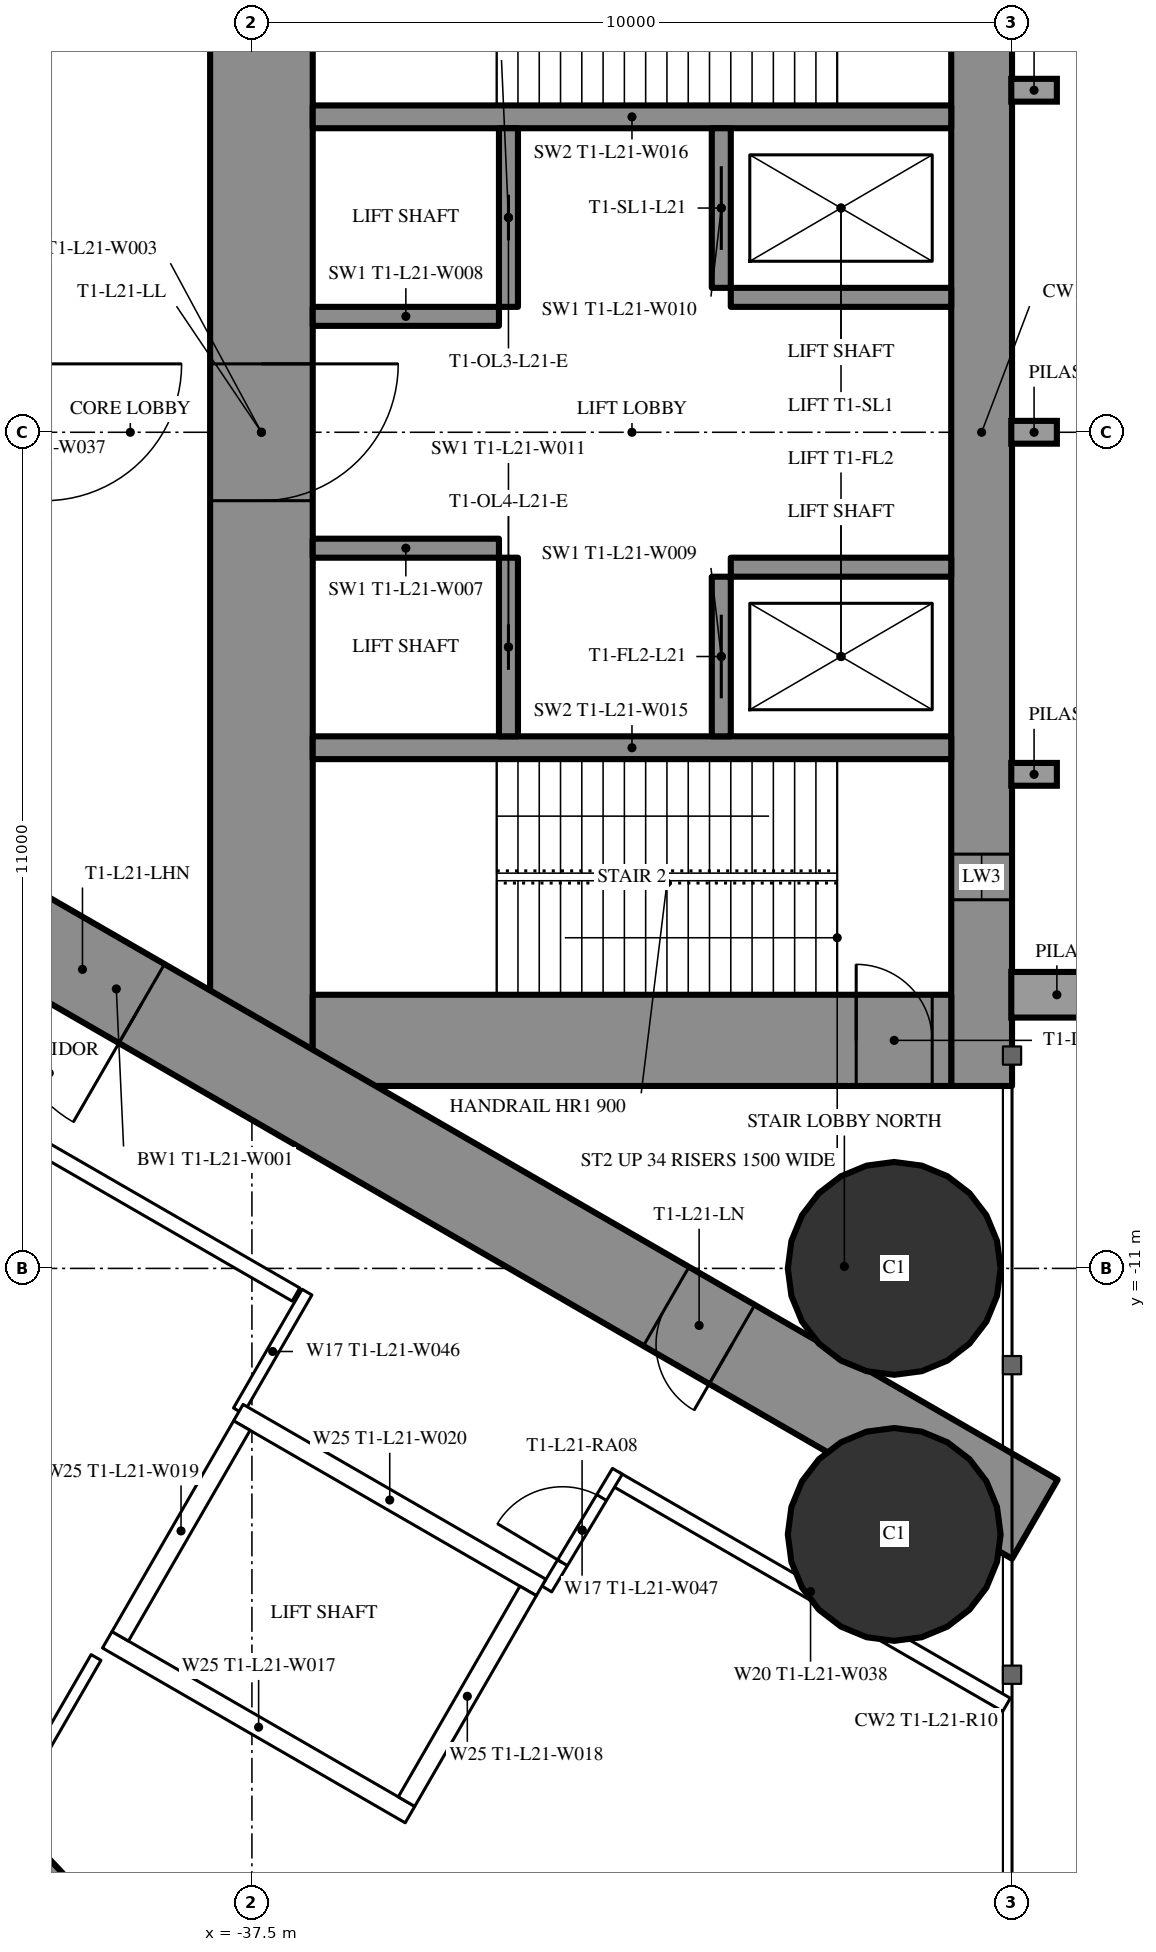
"""IFC4 building model, lengths in metres.
Left out: names, types, materials, properties, quantities, classifications, styles, units other than length and angle.
Written with IfcOpenShell. Run it as: python <this file> out.ifc"""

import sys

from ifc_helpers import new_model, si_unit, direction, frame, frame_2d, origin, origin_2d, place, context, subcontext, project, spatial, rectangle, hollow_circle, extrude, element, fill, save


model = new_model("IFC4")
c1 = context("Model", 3, precision=1e-05, world=origin(), true_north=direction((0.0, 1.0)))
c2 = subcontext(c1, "Body", "Model", "MODEL_VIEW")
j1 = project(units=[si_unit("LENGTHUNIT", "METRE"), si_unit("PLANEANGLEUNIT", "RADIAN")], contexts=[c1])
p1 = place(None, origin())
s1 = spatial("IfcSite", under=j1, at=p1, CompositionType="ELEMENT")
p2 = place(p1, origin())
s2 = spatial("IfcBuilding", under=s1, at=p2, CompositionType="ELEMENT")
p3 = place(p2, frame((0.0, 0.0, 81.0)))
s3 = spatial("IfcBuildingStorey", under=s2, at=p3, CompositionType="ELEMENT", Elevation=81.0)
for number, where, z_axis, x_axis in (
    (1, (-29.05, -11.0, 0.0), (0.0, 0.0, 1.0), (1.0, 0.0, 0.0)),
    (2, (-29.05, -14.5, 0.0), (0.0, 0.0, 1.0), (1.0, 0.0, 0.0)),
):
    element("IfcColumn", number, at=place(p3, frame(where, z_axis=z_axis, x_axis=x_axis)), inside=s3, PredefinedType="COLUMN", context=c2, shape_type="SweptSolid", body=[
        extrude(hollow_circle(Radius=1.4, WallThickness=0.12, at=origin_2d()), origin(), (0.0, 0.0, 1.0), 6.0),
    ])
p4 = place(p3, frame((-43.265, -21.567, 0.0), z_axis=(0.0, 0.0, 1.0), x_axis=(0.728105540353, 0.685465040762, 0.0)))
e3 = element("IfcWall", 3, at=p4, inside=s3, PredefinedType="SHEAR", context=c2, shape_type="SweptSolid", body=[
    extrude(rectangle(XDim=4.174, YDim=2.8, at=frame_2d((2.087, 0.0))), origin(), (0.0, 0.0, 1.0), 6.0),
])
p5 = place(p3, frame((-27.9, 8.6, 0.0), z_axis=(0.0, 0.0, 1.0), x_axis=(0.0, -1.0, 0.0)))
e4 = element("IfcWall", 4, at=p5, inside=s3, PredefinedType="SHEAR", context=c2, shape_type="SweptSolid", body=[
    extrude(rectangle(XDim=17.2, YDim=0.8, at=frame_2d((8.6, 0.0))), origin(), (0.0, 0.0, 1.0), 6.0),
])
p6 = place(p5, frame((2.45, 0.0, 0.6)))
e5 = element("IfcOpeningElement", 5, at=p6, cuts=e4, PredefinedType="OPENING", context=c2, shape_type="SweptSolid", body=[
    extrude(rectangle(XDim=0.6, YDim=4.5, at=frame_2d((0.3, 2.25))), frame((0.0, 0.41, 0.0), z_axis=(0.0, -1.0, 0.0), x_axis=(1.0, 0.0, 0.0)), (0.0, 0.0, 1.0), 0.82),
])
p7 = place(p5, frame((14.15, 0.0, 0.6)))
e6 = element("IfcOpeningElement", 6, at=p7, cuts=e4, PredefinedType="OPENING", context=c2, shape_type="SweptSolid", body=[
    extrude(rectangle(XDim=0.6, YDim=4.5, at=frame_2d((0.3, 2.25))), frame((0.0, 0.41, 0.0), z_axis=(0.0, -1.0, 0.0), x_axis=(1.0, 0.0, 0.0)), (0.0, 0.0, 1.0), 0.82),
])
p8 = place(p3, frame((-37.375, 8.6, 0.0), z_axis=(0.0, 0.0, 1.0), x_axis=(0.0, -1.0, 0.0)))
e7 = element("IfcWall", 7, at=p8, inside=s3, PredefinedType="SHEAR", context=c2, shape_type="SweptSolid", body=[
    extrude(rectangle(XDim=17.2, YDim=1.35, at=frame_2d((8.6, 0.0))), origin(), (0.0, 0.0, 1.0), 6.0),
])
p9 = place(p8, frame((7.7, 0.0, 0.0)))
e8 = element("IfcOpeningElement", 8, at=p9, cuts=e7, PredefinedType="OPENING", context=c2, shape_type="SweptSolid", body=[
    extrude(rectangle(XDim=1.8, YDim=2.2, at=frame_2d((0.9, 1.1))), frame((0.0, 0.685, 0.0), z_axis=(0.0, -1.0, 0.0), x_axis=(1.0, 0.0, 0.0)), (0.0, 0.0, 1.0), 1.37),
])
p10 = place(p3, frame((-28.3, -8.0, 0.0), z_axis=(0.0, 0.0, 1.0), x_axis=(-1.0, 0.0, 0.0)))
e9 = element("IfcWall", 9, at=p10, inside=s3, PredefinedType="SHEAR", context=c2, shape_type="SweptSolid", body=[
    extrude(rectangle(XDim=8.4, YDim=1.2, at=frame_2d((4.2, 0.0))), origin(), (0.0, 0.0, 1.0), 6.0),
])
p11 = place(p10, frame((0.25, 0.0, 0.0)))
e10 = element("IfcOpeningElement", 10, at=p11, cuts=e9, PredefinedType="OPENING", context=c2, shape_type="SweptSolid", body=[
    extrude(rectangle(XDim=1.0, YDim=2.2, at=frame_2d((0.5, 1.1))), frame((0.0, 0.61, 0.0), z_axis=(0.0, -1.0, 0.0), x_axis=(1.0, 0.0, 0.0)), (0.0, 0.0, 1.0), 1.22),
])
for number, where, z_axis, x_axis in (
    (11, (-28.3, 4.15, 0.0), (0.0, 0.0, 1.0), (-1.0, 0.0, 0.0)),
    (12, (-28.3, -4.15, 0.0), (0.0, 0.0, 1.0), (-1.0, 0.0, 0.0)),
):
    element("IfcWall", number, at=place(p3, frame(where, z_axis=z_axis, x_axis=x_axis)), inside=s3, PredefinedType="SHEAR", context=c2, shape_type="SweptSolid", body=[
        extrude(rectangle(XDim=8.4, YDim=0.3, at=frame_2d((4.2, 0.0))), origin(), (0.0, 0.0, 1.0), 6.0),
    ])
p12 = place(p3, frame((-31.325, 4.0, 0.0), z_axis=(0.0, 0.0, 1.0), x_axis=(0.0, -1.0, 0.0)))
e13 = element("IfcWall", 13, at=p12, inside=s3, PredefinedType="SHEAR", context=c2, shape_type="SweptSolid", body=[
    extrude(rectangle(XDim=2.1, YDim=0.25, at=frame_2d((1.05, 0.0))), origin(), (0.0, 0.0, 1.0), 6.0),
])
p13 = place(p12, frame((0.5, 0.0, 0.0)))
e14 = element("IfcOpeningElement", 14, at=p13, cuts=e13, PredefinedType="OPENING", context=c2, shape_type="SweptSolid", body=[
    extrude(rectangle(XDim=1.1, YDim=2.2, at=frame_2d((0.55, 1.1))), frame((0.0, 0.135, 0.0), z_axis=(0.0, -1.0, 0.0), x_axis=(1.0, 0.0, 0.0)), (0.0, 0.0, 1.0), 0.27),
])
p14 = place(p3, frame((-34.125, 4.0, 0.0), z_axis=(0.0, 0.0, 1.0), x_axis=(0.0, -1.0, 0.0)))
e15 = element("IfcWall", 15, at=p14, inside=s3, PredefinedType="SHEAR", context=c2, shape_type="SweptSolid", body=[
    extrude(rectangle(XDim=2.35, YDim=0.25, at=frame_2d((1.175, 0.0))), origin(), (0.0, 0.0, 1.0), 6.0),
])
p15 = place(p14, frame((0.875, 0.0, 0.0)))
e16 = element("IfcOpeningElement", 16, at=p15, cuts=e15, PredefinedType="OPENING", context=c2, shape_type="SweptSolid", body=[
    extrude(rectangle(XDim=0.6, YDim=2.0, at=frame_2d((0.3, 1.0))), frame((0.0, 0.135, 0.0), z_axis=(0.0, -1.0, 0.0), x_axis=(1.0, 0.0, 0.0)), (0.0, 0.0, 1.0), 0.27),
])
p16 = place(p3, frame((-28.3, 1.775, 0.0), z_axis=(0.0, 0.0, 1.0), x_axis=(-1.0, 0.0, 0.0)))
e17 = element("IfcWall", 17, at=p16, inside=s3, PredefinedType="SHEAR", context=c2, shape_type="SweptSolid", body=[
    extrude(rectangle(XDim=2.9, YDim=0.25, at=frame_2d((1.45, 0.0))), origin(), (0.0, 0.0, 1.0), 6.0),
])
p17 = place(p3, frame((-34.25, 1.525, 0.0), z_axis=(0.0, 0.0, 1.0), x_axis=(-1.0, 0.0, 0.0)))
e18 = element("IfcWall", 18, at=p17, inside=s3, PredefinedType="SHEAR", context=c2, shape_type="SweptSolid", body=[
    extrude(rectangle(XDim=2.45, YDim=0.25, at=frame_2d((1.225, 0.0))), origin(), (0.0, 0.0, 1.0), 6.0),
])
p18 = place(p3, frame((-31.325, -1.9, 0.0), z_axis=(0.0, 0.0, 1.0), x_axis=(0.0, -1.0, 0.0)))
e19 = element("IfcWall", 19, at=p18, inside=s3, PredefinedType="SHEAR", context=c2, shape_type="SweptSolid", body=[
    extrude(rectangle(XDim=2.1, YDim=0.25, at=frame_2d((1.05, 0.0))), origin(), (0.0, 0.0, 1.0), 6.0),
])
p19 = place(p18, frame((0.5, 0.0, 0.0)))
e20 = element("IfcOpeningElement", 20, at=p19, cuts=e19, PredefinedType="OPENING", context=c2, shape_type="SweptSolid", body=[
    extrude(rectangle(XDim=1.1, YDim=2.2, at=frame_2d((0.55, 1.1))), frame((0.0, 0.135, 0.0), z_axis=(0.0, -1.0, 0.0), x_axis=(1.0, 0.0, 0.0)), (0.0, 0.0, 1.0), 0.27),
])
p20 = place(p3, frame((-34.125, -1.65, 0.0), z_axis=(0.0, 0.0, 1.0), x_axis=(0.0, -1.0, 0.0)))
e21 = element("IfcWall", 21, at=p20, inside=s3, PredefinedType="SHEAR", context=c2, shape_type="SweptSolid", body=[
    extrude(rectangle(XDim=2.35, YDim=0.25, at=frame_2d((1.175, 0.0))), origin(), (0.0, 0.0, 1.0), 6.0),
])
p21 = place(p20, frame((0.875, 0.0, 0.0)))
e22 = element("IfcOpeningElement", 22, at=p21, cuts=e21, PredefinedType="OPENING", context=c2, shape_type="SweptSolid", body=[
    extrude(rectangle(XDim=0.6, YDim=2.0, at=frame_2d((0.3, 1.0))), frame((0.0, 0.135, 0.0), z_axis=(0.0, -1.0, 0.0), x_axis=(1.0, 0.0, 0.0)), (0.0, 0.0, 1.0), 0.27),
])
p22 = place(p3, frame((-28.3, -1.775, 0.0), z_axis=(0.0, 0.0, 1.0), x_axis=(-1.0, 0.0, 0.0)))
e23 = element("IfcWall", 23, at=p22, inside=s3, PredefinedType="SHEAR", context=c2, shape_type="SweptSolid", body=[
    extrude(rectangle(XDim=2.9, YDim=0.25, at=frame_2d((1.45, 0.0))), origin(), (0.0, 0.0, 1.0), 6.0),
])
p23 = place(p3, frame((-34.25, -1.525, 0.0), z_axis=(0.0, 0.0, 1.0), x_axis=(-1.0, 0.0, 0.0)))
e24 = element("IfcWall", 24, at=p23, inside=s3, PredefinedType="SHEAR", context=c2, shape_type="SweptSolid", body=[
    extrude(rectangle(XDim=2.45, YDim=0.25, at=frame_2d((1.225, 0.0))), origin(), (0.0, 0.0, 1.0), 6.0),
])
p24 = place(p3, frame((-27.2, 14.3, 0.0), z_axis=(0.0, 0.0, 1.0), x_axis=(-0.866026593062, -0.499997940104, 0.0)))
e25 = element("IfcWall", 25, at=p24, inside=s3, PredefinedType="SHEAR", context=c2, shape_type="SweptSolid", body=[
    extrude(rectangle(XDim=28.946, YDim=1.2, at=frame_2d((14.473, 0.0))), origin(), (0.0, 0.0, 1.0), 6.0),
])
p25 = place(p24, frame((4.6, 0.0, 0.0)))
e26 = element("IfcOpeningElement", 26, at=p25, cuts=e25, PredefinedType="OPENING", context=c2, shape_type="SweptSolid", body=[
    extrude(rectangle(XDim=1.0, YDim=2.2, at=frame_2d((0.5, 1.1))), frame((0.0, 0.61, 0.0), z_axis=(0.0, -1.0, 0.0), x_axis=(1.0, 0.0, 0.0)), (0.0, 0.0, 1.0), 1.22),
])
p26 = place(p24, frame((13.568, 0.0, 0.0)))
e27 = element("IfcOpeningElement", 27, at=p26, cuts=e25, PredefinedType="OPENING", context=c2, shape_type="SweptSolid", body=[
    extrude(rectangle(XDim=1.8, YDim=2.2, at=frame_2d((0.9, 1.1))), frame((0.0, 0.61, 0.0), z_axis=(0.0, -1.0, 0.0), x_axis=(1.0, 0.0, 0.0)), (0.0, 0.0, 1.0), 1.22),
])
p27 = place(p3, frame((-27.2, -14.3, 0.0), z_axis=(0.0, 0.0, 1.0), x_axis=(-0.866024021859, 0.500002393557, 0.0)))
e28 = element("IfcWall", 28, at=p27, inside=s3, PredefinedType="SHEAR", context=c2, shape_type="SweptSolid", body=[
    extrude(rectangle(XDim=27.907, YDim=1.2, at=frame_2d((13.954, 0.0))), origin(), (0.0, 0.0, 1.0), 6.0),
])
p28 = place(p27, frame((4.6, 0.0, 0.0)))
e29 = element("IfcOpeningElement", 29, at=p28, cuts=e28, PredefinedType="OPENING", context=c2, shape_type="SweptSolid", body=[
    extrude(rectangle(XDim=1.0, YDim=2.2, at=frame_2d((0.5, 1.1))), frame((0.0, 0.61, 0.0), z_axis=(0.0, -1.0, 0.0), x_axis=(1.0, 0.0, 0.0)), (0.0, 0.0, 1.0), 1.22),
])
p29 = place(p27, frame((13.568, 0.0, 0.0)))
e30 = element("IfcOpeningElement", 30, at=p29, cuts=e28, PredefinedType="OPENING", context=c2, shape_type="SweptSolid", body=[
    extrude(rectangle(XDim=1.8, YDim=2.2, at=frame_2d((0.9, 1.1))), frame((0.0, 0.61, 0.0), z_axis=(0.0, -1.0, 0.0), x_axis=(1.0, 0.0, 0.0)), (0.0, 0.0, 1.0), 1.22),
])
p30 = place(p3, frame((-39.551, -16.118, 0.0), z_axis=(0.0, 0.0, 1.0), x_axis=(-0.499986503906, -0.866033195618, 0.0)))
e31 = element("IfcWall", 31, at=p30, inside=s3, PredefinedType="PARTITIONING", context=c2, shape_type="SweptSolid", body=[
    extrude(rectangle(XDim=3.815, YDim=0.15, at=frame_2d((1.907, 0.0))), origin(), (0.0, 0.0, 1.0), 5.75),
])
p31 = place(p3, frame((-37.7, 10.894, 0.0), z_axis=(0.0, 0.0, 1.0), x_axis=(-0.866027905338, -0.499995667157, 0.0)))
e32 = element("IfcWall", 32, at=p31, inside=s3, PredefinedType="PARTITIONING", context=c2, shape_type="SweptSolid", body=[
    extrude(rectangle(XDim=21.787, YDim=0.2, at=frame_2d((10.894, 0.0))), origin(), (0.0, 0.0, 1.0), 5.75),
])
p32 = place(p31, frame((15.369, 0.0, 0.0)))
e33 = element("IfcOpeningElement", 33, at=p32, cuts=e32, PredefinedType="OPENING", context=c2, shape_type="SweptSolid", body=[
    extrude(rectangle(XDim=1.8, YDim=2.2, at=frame_2d((0.9, 1.1))), frame((0.0, 0.11, 0.0), z_axis=(0.0, -1.0, 0.0), x_axis=(1.0, 0.0, 0.0)), (0.0, 0.0, 1.0), 0.22),
])
p33 = place(p31, frame((4.476, 0.0, 0.0)))
e34 = element("IfcOpeningElement", 34, at=p33, cuts=e32, PredefinedType="OPENING", context=c2, shape_type="SweptSolid", body=[
    extrude(rectangle(XDim=1.8, YDim=2.2, at=frame_2d((0.9, 1.1))), frame((0.0, 0.11, 0.0), z_axis=(0.0, -1.0, 0.0), x_axis=(1.0, 0.0, 0.0)), (0.0, 0.0, 1.0), 0.22),
])
p34 = place(p3, frame((-27.572, -16.741, 0.0), z_axis=(0.0, 0.0, 1.0), x_axis=(-0.866024464444, 0.500001626982, 0.0)))
e35 = element("IfcWall", 35, at=p34, inside=s3, PredefinedType="PARTITIONING", context=c2, shape_type="SweptSolid", body=[
    extrude(rectangle(XDim=5.955, YDim=0.2, at=frame_2d((2.978, 0.0))), origin(), (0.0, 0.0, 1.0), 5.75),
])
p35 = place(p3, frame((-36.92, -11.344, 0.0), z_axis=(0.0, 0.0, 1.0), x_axis=(-0.866028313256, 0.499994960614, 0.0)))
e36 = element("IfcWall", 36, at=p35, inside=s3, PredefinedType="PARTITIONING", context=c2, shape_type="SweptSolid", body=[
    extrude(rectangle(XDim=22.568, YDim=0.2, at=frame_2d((11.284, 0.0))), origin(), (0.0, 0.0, 1.0), 5.75),
])
p36 = place(p35, frame((16.27, 0.0, 0.0)))
e37 = element("IfcOpeningElement", 37, at=p36, cuts=e36, PredefinedType="OPENING", context=c2, shape_type="SweptSolid", body=[
    extrude(rectangle(XDim=1.8, YDim=2.2, at=frame_2d((0.9, 1.1))), frame((0.0, 0.11, 0.0), z_axis=(0.0, -1.0, 0.0), x_axis=(1.0, 0.0, 0.0)), (0.0, 0.0, 1.0), 0.22),
])
p37 = place(p35, frame((4.826, 0.0, 0.0)))
e38 = element("IfcOpeningElement", 38, at=p37, cuts=e36, PredefinedType="OPENING", context=c2, shape_type="SweptSolid", body=[
    extrude(rectangle(XDim=2.0, YDim=2.4, at=frame_2d((1.0, 1.2))), frame((0.0, 0.11, 0.0), z_axis=(0.0, -1.0, 0.0), x_axis=(1.0, 0.0, 0.0)), (0.0, 0.0, 1.0), 0.22),
])
p38 = place(p3, frame((-36.776, -11.312, 0.0), z_axis=(0.0, 0.0, 1.0), x_axis=(-0.500038651731, -0.866003087047, 0.0)))
e39 = element("IfcWall", 39, at=p38, inside=s3, PredefinedType="PARTITIONING", context=c2, shape_type="SweptSolid", body=[
    extrude(rectangle(XDim=1.804, YDim=0.15, at=frame_2d((0.902, 0.0))), origin(), (0.0, 0.0, 1.0), 5.75),
])
p39 = place(p3, frame((-33.621, -15.218, 0.0), z_axis=(0.0, 0.0, 1.0), x_axis=(0.514336634837, 0.857588377991, 0.0)))
e40 = element("IfcWall", 40, at=p39, inside=s3, PredefinedType="PARTITIONING", context=c2, shape_type="SweptSolid", body=[
    extrude(rectangle(XDim=1.805, YDim=0.15, at=frame_2d((0.903, 0.0))), origin(), (0.0, 0.0, 1.0), 5.75),
])
p40 = place(p39, frame((0.403, 0.0, 0.0)))
e41 = element("IfcOpeningElement", 41, at=p40, cuts=e40, PredefinedType="OPENING", context=c2, shape_type="SweptSolid", body=[
    extrude(rectangle(XDim=1.0, YDim=2.2, at=frame_2d((0.5, 1.1))), frame((0.0, 0.085, 0.0), z_axis=(0.0, -1.0, 0.0), x_axis=(1.0, 0.0, 0.0)), (0.0, 0.0, 1.0), 0.17),
])
p41 = place(p3, frame((-33.696, -15.197, 0.0), z_axis=(0.0, 0.0, 1.0), x_axis=(-0.865976953817, 0.500083908417, 0.0)))
e42 = element("IfcWall", 42, at=p41, inside=s3, PredefinedType="PARTITIONING", context=c2, shape_type="SweptSolid", body=[
    extrude(rectangle(XDim=4.599, YDim=0.25, at=frame_2d((2.3, 0.0))), origin(), (0.0, 0.0, 1.0), 5.75),
])
p42 = place(p3, frame((-35.42, -18.186, 0.0), z_axis=(0.0, 0.0, 1.0), x_axis=(-0.865990227814, 0.50006092162, 0.0)))
e43 = element("IfcWall", 43, at=p42, inside=s3, PredefinedType="PARTITIONING", context=c2, shape_type="SweptSolid", body=[
    extrude(rectangle(XDim=4.6, YDim=0.25, at=frame_2d((2.3, 0.0))), origin(), (0.0, 0.0, 1.0), 5.75),
])
p43 = place(p3, frame((-33.866, -15.243, 0.0), z_axis=(0.0, 0.0, 1.0), x_axis=(-0.499929347863, -0.866066190972, 0.0)))
e44 = element("IfcWall", 44, at=p43, inside=s3, PredefinedType="PARTITIONING", context=c2, shape_type="SweptSolid", body=[
    extrude(rectangle(XDim=3.201, YDim=0.25, at=frame_2d((1.6, 0.0))), origin(), (0.0, 0.0, 1.0), 5.75),
])
p44 = place(p3, frame((-37.633, -13.068, 0.0), z_axis=(0.0, 0.0, 1.0), x_axis=(-0.499872130319, -0.866099216793, 0.0)))
e45 = element("IfcWall", 45, at=p44, inside=s3, PredefinedType="PARTITIONING", context=c2, shape_type="SweptSolid", body=[
    extrude(rectangle(XDim=3.2, YDim=0.25, at=frame_2d((1.6, 0.0))), origin(), (0.0, 0.0, 1.0), 5.75),
])
p45 = place(p40, origin())
e46 = element("IfcDoor", 46, at=p45, inside=s3, OperationType="SINGLE_SWING_LEFT", PredefinedType="DOOR", context=c2, shape_type="SweptSolid", body=[
    extrude(rectangle(XDim=1.0, YDim=2.2, at=frame_2d((0.5, 1.1))), frame((0.0, 0.025, 0.0), z_axis=(0.0, -1.0, 0.0), x_axis=(1.0, 0.0, 0.0)), (0.0, 0.0, 1.0), 0.05),
])
fill(e41, e46)
p46 = place(p28, origin())
e47 = element("IfcDoor", 47, at=p46, inside=s3, OperationType="SINGLE_SWING_LEFT", PredefinedType="DOOR", context=c2, shape_type="SweptSolid", body=[
    extrude(rectangle(XDim=1.0, YDim=2.2, at=frame_2d((0.5, 1.1))), frame((0.0, 0.025, 0.0), z_axis=(0.0, -1.0, 0.0), x_axis=(1.0, 0.0, 0.0)), (0.0, 0.0, 1.0), 0.05),
])
fill(e29, e47)
p47 = place(p29, origin())
e48 = element("IfcDoor", 48, at=p47, inside=s3, OperationType="DOUBLE_DOOR_SINGLE_SWING", PredefinedType="DOOR", context=c2, shape_type="SweptSolid", body=[
    extrude(rectangle(XDim=1.8, YDim=2.2, at=frame_2d((0.9, 1.1))), frame((0.0, 0.025, 0.0), z_axis=(0.0, -1.0, 0.0), x_axis=(1.0, 0.0, 0.0)), (0.0, 0.0, 1.0), 0.05),
])
fill(e30, e48)
p48 = place(p9, origin())
e49 = element("IfcDoor", 49, at=p48, inside=s3, OperationType="DOUBLE_DOOR_SINGLE_SWING", PredefinedType="DOOR", context=c2, shape_type="SweptSolid", body=[
    extrude(rectangle(XDim=1.8, YDim=2.2, at=frame_2d((0.9, 1.1))), frame((0.0, 0.025, 0.0), z_axis=(0.0, -1.0, 0.0), x_axis=(1.0, 0.0, 0.0)), (0.0, 0.0, 1.0), 0.05),
])
fill(e8, e49)
p49 = place(p11, origin())
e50 = element("IfcDoor", 50, at=p49, inside=s3, OperationType="SINGLE_SWING_RIGHT", PredefinedType="DOOR", context=c2, shape_type="SweptSolid", body=[
    extrude(rectangle(XDim=1.0, YDim=2.2, at=frame_2d((0.5, 1.1))), frame((0.0, 0.025, 0.0), z_axis=(0.0, -1.0, 0.0), x_axis=(1.0, 0.0, 0.0)), (0.0, 0.0, 1.0), 0.05),
])
fill(e10, e50)
p50 = place(p13, origin())
e51 = element("IfcDoor", 51, at=p50, inside=s3, OperationType="SLIDING_TO_LEFT", PredefinedType="USERDEFINED", context=c2, shape_type="SweptSolid", body=[
    extrude(rectangle(XDim=1.1, YDim=2.2, at=frame_2d((0.55, 1.1))), frame((0.0, 0.025, 0.0), z_axis=(0.0, -1.0, 0.0), x_axis=(1.0, 0.0, 0.0)), (0.0, 0.0, 1.0), 0.05),
])
fill(e14, e51)
p51 = place(p19, origin())
e52 = element("IfcDoor", 52, at=p51, inside=s3, OperationType="SLIDING_TO_LEFT", PredefinedType="USERDEFINED", context=c2, shape_type="SweptSolid", body=[
    extrude(rectangle(XDim=1.1, YDim=2.2, at=frame_2d((0.55, 1.1))), frame((0.0, 0.025, 0.0), z_axis=(0.0, -1.0, 0.0), x_axis=(1.0, 0.0, 0.0)), (0.0, 0.0, 1.0), 0.05),
])
fill(e20, e52)
p52 = place(p15, origin())
e53 = element("IfcDoor", 53, at=p52, inside=s3, OperationType="SLIDING_TO_LEFT", PredefinedType="DOOR", context=c2, shape_type="SweptSolid", body=[
    extrude(rectangle(XDim=0.6, YDim=2.0, at=frame_2d((0.3, 1.0))), frame((0.0, 0.025, 0.0), z_axis=(0.0, -1.0, 0.0), x_axis=(1.0, 0.0, 0.0)), (0.0, 0.0, 1.0), 0.05),
])
fill(e16, e53)
p53 = place(p21, origin())
e54 = element("IfcDoor", 54, at=p53, inside=s3, OperationType="SLIDING_TO_LEFT", PredefinedType="DOOR", context=c2, shape_type="SweptSolid", body=[
    extrude(rectangle(XDim=0.6, YDim=2.0, at=frame_2d((0.3, 1.0))), frame((0.0, 0.025, 0.0), z_axis=(0.0, -1.0, 0.0), x_axis=(1.0, 0.0, 0.0)), (0.0, 0.0, 1.0), 0.05),
])
fill(e22, e54)
p54 = place(p7, origin())
e55 = element("IfcWindow", 55, at=p54, inside=s3, PartitioningType="SINGLE_PANEL", PredefinedType="WINDOW", context=c2, shape_type="SweptSolid", body=[
    extrude(rectangle(XDim=0.6, YDim=4.5, at=frame_2d((0.3, 2.25))), frame((0.0, 0.03, 0.0), z_axis=(0.0, -1.0, 0.0), x_axis=(1.0, 0.0, 0.0)), (0.0, 0.0, 1.0), 0.06),
])
fill(e6, e55)
save(model, sys.argv[1])
